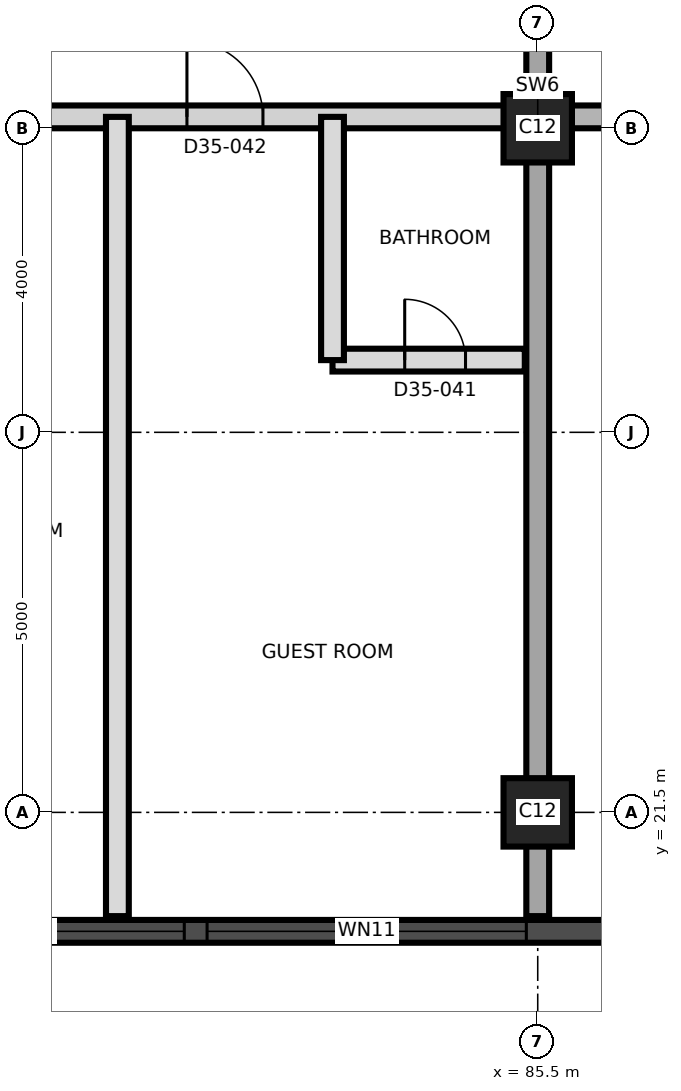
"""IFC4 building model, lengths in metres.
Left out: names, types, materials, properties, quantities, classifications, styles, units other than length and angle.
Written with IfcOpenShell. Run it as: python <this file> out.ifc"""

import sys

from ifc_helpers import new_model, si_unit, direction, frame, frame_2d, origin, origin_2d, place, context, subcontext, project, spatial, rectangle, extrude, element, fill, save


model = new_model("IFC4")
c1 = context("Model", 3, precision=1e-05, world=origin(), true_north=direction((0.0, 1.0)))
c2 = subcontext(c1, "Body", "Model", "MODEL_VIEW")
j1 = project(units=[si_unit("LENGTHUNIT", "METRE"), si_unit("PLANEANGLEUNIT", "RADIAN")], contexts=[c1])
p1 = place(None, origin())
s1 = spatial("IfcSite", under=j1, at=p1, CompositionType="ELEMENT")
p2 = place(p1, origin())
s2 = spatial("IfcBuilding", under=s1, at=p2, CompositionType="ELEMENT")
p3 = place(p2, frame((0.0, 0.0, 195.8)))
s3 = spatial("IfcBuildingStorey", under=s2, at=p3, CompositionType="ELEMENT", Elevation=195.8)
for number, where, z_axis, x_axis in (
    (1, (85.5, 21.5, 0.0), (0.0, 0.0, 1.0), (1.0, 0.0, 0.0)),
    (2, (85.5, 30.5, 0.0), (0.0, 0.0, 1.0), (1.0, 0.0, 0.0)),
):
    element("IfcColumn", number, at=place(p3, frame(where, z_axis=z_axis, x_axis=x_axis)), inside=s3, PredefinedType="COLUMN", context=c2, shape_type="SweptSolid", body=[
        extrude(rectangle(XDim=0.9, YDim=0.9, at=origin_2d()), origin(), (0.0, 0.0, 1.0), 3.7),
    ])
p4 = place(p3, frame((85.5, 20.135, 0.0), z_axis=(0.0, 0.0, 1.0), x_axis=(0.0, 1.0, 0.0)))
e3 = element("IfcWall", 3, at=p4, inside=s3, PredefinedType="SHEAR", context=c2, shape_type="SweptSolid", body=[
    extrude(rectangle(XDim=20.73, YDim=0.3, at=frame_2d((10.365, 0.0))), origin(), (0.0, 0.0, 1.0), 3.7),
])
p5 = place(p4, frame((11.565, 0.0, 0.0)))
e4 = element("IfcOpeningElement", 4, at=p5, cuts=e3, PredefinedType="OPENING", context=c2, shape_type="SweptSolid", body=[
    extrude(rectangle(XDim=1.4, YDim=2.1, at=frame_2d((0.7, 1.05))), frame((0.0, 0.16, 0.0), z_axis=(0.0, -1.0, 0.0), x_axis=(1.0, 0.0, 0.0)), (0.0, 0.0, 1.0), 0.32),
])
p6 = place(p3, frame((44.01, 19.935, 0.0), z_axis=(0.0, 0.0, 1.0), x_axis=(1.0, 0.0, 0.0)))
e5 = element("IfcWall", 5, at=p6, inside=s3, PredefinedType="SOLIDWALL", context=c2, shape_type="SweptSolid", body=[
    extrude(rectangle(XDim=43.477, YDim=0.3, at=frame_2d((21.738, 0.0))), origin(), (0.0, 0.0, 1.0), 3.4),
])
p7 = place(p6, frame((1.845, 0.0, 0.3)))
e6 = element("IfcOpeningElement", 6, at=p7, cuts=e5, PredefinedType="OPENING", context=c2, shape_type="SweptSolid", body=[
    extrude(rectangle(XDim=1.8, YDim=2.4, at=frame_2d((0.9, 1.2))), frame((0.0, 0.16, 0.0), z_axis=(0.0, -1.0, 0.0), x_axis=(1.0, 0.0, 0.0)), (0.0, 0.0, 1.0), 0.32),
])
p8 = place(p6, frame((5.64, 0.0, 0.9)))
e7 = element("IfcOpeningElement", 7, at=p8, cuts=e5, PredefinedType="OPENING", context=c2, shape_type="SweptSolid", body=[
    extrude(rectangle(XDim=4.2, YDim=1.5, at=frame_2d((2.1, 0.75))), frame((0.0, 0.16, 0.0), z_axis=(0.0, -1.0, 0.0), x_axis=(1.0, 0.0, 0.0)), (0.0, 0.0, 1.0), 0.32),
])
p9 = place(p6, frame((10.14, 0.0, 0.9)))
e8 = element("IfcOpeningElement", 8, at=p9, cuts=e5, PredefinedType="OPENING", context=c2, shape_type="SweptSolid", body=[
    extrude(rectangle(XDim=4.2, YDim=1.5, at=frame_2d((2.1, 0.75))), frame((0.0, 0.16, 0.0), z_axis=(0.0, -1.0, 0.0), x_axis=(1.0, 0.0, 0.0)), (0.0, 0.0, 1.0), 0.32),
])
p10 = place(p6, frame((14.64, 0.0, 0.9)))
e9 = element("IfcOpeningElement", 9, at=p10, cuts=e5, PredefinedType="OPENING", context=c2, shape_type="SweptSolid", body=[
    extrude(rectangle(XDim=4.2, YDim=1.5, at=frame_2d((2.1, 0.75))), frame((0.0, 0.16, 0.0), z_axis=(0.0, -1.0, 0.0), x_axis=(1.0, 0.0, 0.0)), (0.0, 0.0, 1.0), 0.32),
])
p11 = place(p6, frame((19.14, 0.0, 0.9)))
e10 = element("IfcOpeningElement", 10, at=p11, cuts=e5, PredefinedType="OPENING", context=c2, shape_type="SweptSolid", body=[
    extrude(rectangle(XDim=4.2, YDim=1.5, at=frame_2d((2.1, 0.75))), frame((0.0, 0.16, 0.0), z_axis=(0.0, -1.0, 0.0), x_axis=(1.0, 0.0, 0.0)), (0.0, 0.0, 1.0), 0.32),
])
p12 = place(p6, frame((23.64, 0.0, 0.9)))
e11 = element("IfcOpeningElement", 11, at=p12, cuts=e5, PredefinedType="OPENING", context=c2, shape_type="SweptSolid", body=[
    extrude(rectangle(XDim=4.2, YDim=1.5, at=frame_2d((2.1, 0.75))), frame((0.0, 0.16, 0.0), z_axis=(0.0, -1.0, 0.0), x_axis=(1.0, 0.0, 0.0)), (0.0, 0.0, 1.0), 0.32),
])
p13 = place(p6, frame((28.14, 0.0, 0.9)))
e12 = element("IfcOpeningElement", 12, at=p13, cuts=e5, PredefinedType="OPENING", context=c2, shape_type="SweptSolid", body=[
    extrude(rectangle(XDim=4.2, YDim=1.5, at=frame_2d((2.1, 0.75))), frame((0.0, 0.16, 0.0), z_axis=(0.0, -1.0, 0.0), x_axis=(1.0, 0.0, 0.0)), (0.0, 0.0, 1.0), 0.32),
])
p14 = place(p6, frame((32.64, 0.0, 0.9)))
e13 = element("IfcOpeningElement", 13, at=p14, cuts=e5, PredefinedType="OPENING", context=c2, shape_type="SweptSolid", body=[
    extrude(rectangle(XDim=4.2, YDim=1.5, at=frame_2d((2.1, 0.75))), frame((0.0, 0.16, 0.0), z_axis=(0.0, -1.0, 0.0), x_axis=(1.0, 0.0, 0.0)), (0.0, 0.0, 1.0), 0.32),
])
p15 = place(p6, frame((37.14, 0.0, 0.9)))
e14 = element("IfcOpeningElement", 14, at=p15, cuts=e5, PredefinedType="OPENING", context=c2, shape_type="SweptSolid", body=[
    extrude(rectangle(XDim=4.2, YDim=1.5, at=frame_2d((2.1, 0.75))), frame((0.0, 0.16, 0.0), z_axis=(0.0, -1.0, 0.0), x_axis=(1.0, 0.0, 0.0)), (0.0, 0.0, 1.0), 0.32),
])
p16 = place(p3, frame((82.8, 27.45, 0.0), z_axis=(0.0, 0.0, 1.0), x_axis=(1.0, 0.0, 0.0)))
e15 = element("IfcWall", 15, at=p16, inside=s3, PredefinedType="PARTITIONING", context=c2, shape_type="SweptSolid", body=[
    extrude(rectangle(XDim=2.53, YDim=0.3, at=frame_2d((1.265, 0.0))), origin(), (0.0, 0.0, 1.0), 3.4),
])
p17 = place(p16, frame((0.95, 0.0, 0.0)))
e16 = element("IfcOpeningElement", 16, at=p17, cuts=e15, PredefinedType="OPENING", context=c2, shape_type="SweptSolid", body=[
    extrude(rectangle(XDim=0.8, YDim=2.1, at=frame_2d((0.4, 1.05))), frame((0.0, 0.16, 0.0), z_axis=(0.0, -1.0, 0.0), x_axis=(1.0, 0.0, 0.0)), (0.0, 0.0, 1.0), 0.32),
])
p18 = place(p3, frame((58.55, 30.65, 0.0), z_axis=(0.0, 0.0, 1.0), x_axis=(1.0, 0.0, 0.0)))
e17 = element("IfcWall", 17, at=p18, inside=s3, PredefinedType="PARTITIONING", context=c2, shape_type="SweptSolid", body=[
    extrude(rectangle(XDim=26.78, YDim=0.3, at=frame_2d((13.39, 0.0))), origin(), (0.0, 0.0, 1.0), 3.4),
])
p19 = place(p18, frame((1.65, 0.0, 0.0)))
e18 = element("IfcOpeningElement", 18, at=p19, cuts=e17, PredefinedType="OPENING", context=c2, shape_type="SweptSolid", body=[
    extrude(rectangle(XDim=1.2, YDim=2.1, at=frame_2d((0.6, 1.05))), frame((0.0, 0.16, 0.0), z_axis=(0.0, -1.0, 0.0), x_axis=(1.0, 0.0, 0.0)), (0.0, 0.0, 1.0), 0.32),
])
p20 = place(p18, frame((4.9, 0.0, 0.0)))
e19 = element("IfcOpeningElement", 19, at=p20, cuts=e17, PredefinedType="OPENING", context=c2, shape_type="SweptSolid", body=[
    extrude(rectangle(XDim=1.0, YDim=2.1, at=frame_2d((0.5, 1.05))), frame((0.0, 0.16, 0.0), z_axis=(0.0, -1.0, 0.0), x_axis=(1.0, 0.0, 0.0)), (0.0, 0.0, 1.0), 0.32),
])
p21 = place(p18, frame((10.085, 0.0, 0.0)))
e20 = element("IfcOpeningElement", 20, at=p21, cuts=e17, PredefinedType="OPENING", context=c2, shape_type="SweptSolid", body=[
    extrude(rectangle(XDim=1.2, YDim=2.1, at=frame_2d((0.6, 1.05))), frame((0.0, 0.16, 0.0), z_axis=(0.0, -1.0, 0.0), x_axis=(1.0, 0.0, 0.0)), (0.0, 0.0, 1.0), 0.32),
])
p22 = place(p18, frame((13.335, 0.0, 0.0)))
e21 = element("IfcOpeningElement", 21, at=p22, cuts=e17, PredefinedType="OPENING", context=c2, shape_type="SweptSolid", body=[
    extrude(rectangle(XDim=1.0, YDim=2.1, at=frame_2d((0.5, 1.05))), frame((0.0, 0.16, 0.0), z_axis=(0.0, -1.0, 0.0), x_axis=(1.0, 0.0, 0.0)), (0.0, 0.0, 1.0), 0.32),
])
p23 = place(p18, frame((19.085, 0.0, 0.0)))
e22 = element("IfcOpeningElement", 22, at=p23, cuts=e17, PredefinedType="OPENING", context=c2, shape_type="SweptSolid", body=[
    extrude(rectangle(XDim=1.2, YDim=2.1, at=frame_2d((0.6, 1.05))), frame((0.0, 0.16, 0.0), z_axis=(0.0, -1.0, 0.0), x_axis=(1.0, 0.0, 0.0)), (0.0, 0.0, 1.0), 0.32),
])
p24 = place(p18, frame((22.335, 0.0, 0.0)))
e23 = element("IfcOpeningElement", 23, at=p24, cuts=e17, PredefinedType="OPENING", context=c2, shape_type="SweptSolid", body=[
    extrude(rectangle(XDim=1.0, YDim=2.1, at=frame_2d((0.5, 1.05))), frame((0.0, 0.16, 0.0), z_axis=(0.0, -1.0, 0.0), x_axis=(1.0, 0.0, 0.0)), (0.0, 0.0, 1.0), 0.32),
])
p25 = place(p3, frame((85.67, 30.65, 0.0), z_axis=(0.0, 0.0, 1.0), x_axis=(1.0, 0.0, 0.0)))
e24 = element("IfcWall", 24, at=p25, inside=s3, PredefinedType="SHEAR", context=c2, shape_type="SweptSolid", body=[
    extrude(rectangle(XDim=9.58, YDim=0.3, at=frame_2d((4.79, 0.0))), origin(), (0.0, 0.0, 1.0), 3.4),
])
p26 = place(p25, frame((2.08, 0.0, 0.0)))
e25 = element("IfcOpeningElement", 25, at=p26, cuts=e24, PredefinedType="OPENING", context=c2, shape_type="SweptSolid", body=[
    extrude(rectangle(XDim=1.2, YDim=2.1, at=frame_2d((0.6, 1.05))), frame((0.0, 0.16, 0.0), z_axis=(0.0, -1.0, 0.0), x_axis=(1.0, 0.0, 0.0)), (0.0, 0.0, 1.0), 0.32),
])
p27 = place(p25, frame((5.63, 0.0, 0.0)))
e26 = element("IfcOpeningElement", 26, at=p27, cuts=e24, PredefinedType="OPENING", context=c2, shape_type="SweptSolid", body=[
    extrude(rectangle(XDim=1.0, YDim=2.1, at=frame_2d((0.5, 1.05))), frame((0.0, 0.16, 0.0), z_axis=(0.0, -1.0, 0.0), x_axis=(1.0, 0.0, 0.0)), (0.0, 0.0, 1.0), 0.32),
])
p28 = place(p3, frame((79.97, 20.135, 0.0), z_axis=(0.0, 0.0, 1.0), x_axis=(0.0, 1.0, 0.0)))
e27 = element("IfcWall", 27, at=p28, inside=s3, PredefinedType="PARTITIONING", context=c2, shape_type="SweptSolid", body=[
    extrude(rectangle(XDim=10.515, YDim=0.3, at=frame_2d((5.257, 0.0))), origin(), (0.0, 0.0, 1.0), 3.4),
])
p29 = place(p3, frame((82.8, 27.45, 0.0), z_axis=(0.0, 0.0, 1.0), x_axis=(0.0, 1.0, 0.0)))
e28 = element("IfcWall", 28, at=p29, inside=s3, PredefinedType="PARTITIONING", context=c2, shape_type="SweptSolid", body=[
    extrude(rectangle(XDim=3.2, YDim=0.3, at=frame_2d((1.6, 0.0))), origin(), (0.0, 0.0, 1.0), 3.4),
])
p30 = place(p14, origin())
e29 = element("IfcWindow", 29, at=p30, inside=s3, PartitioningType="SINGLE_PANEL", PredefinedType="WINDOW", context=c2, shape_type="SweptSolid", body=[
    extrude(rectangle(XDim=4.2, YDim=1.5, at=frame_2d((2.1, 0.75))), frame((0.0, 0.03, 0.0), z_axis=(0.0, -1.0, 0.0), x_axis=(1.0, 0.0, 0.0)), (0.0, 0.0, 1.0), 0.06),
])
fill(e13, e29)
p31 = place(p15, origin())
e30 = element("IfcWindow", 30, at=p31, inside=s3, PartitioningType="SINGLE_PANEL", PredefinedType="WINDOW", context=c2, shape_type="SweptSolid", body=[
    extrude(rectangle(XDim=4.2, YDim=1.5, at=frame_2d((2.1, 0.75))), frame((0.0, 0.03, 0.0), z_axis=(0.0, -1.0, 0.0), x_axis=(1.0, 0.0, 0.0)), (0.0, 0.0, 1.0), 0.06),
])
fill(e14, e30)
p32 = place(p17, origin())
e31 = element("IfcDoor", 31, at=p32, inside=s3, OperationType="SINGLE_SWING_LEFT", PredefinedType="DOOR", context=c2, shape_type="SweptSolid", body=[
    extrude(rectangle(XDim=0.8, YDim=2.1, at=frame_2d((0.4, 1.05))), frame((0.0, 0.025, 0.0), z_axis=(0.0, -1.0, 0.0), x_axis=(1.0, 0.0, 0.0)), (0.0, 0.0, 1.0), 0.05),
])
fill(e16, e31)
p33 = place(p24, origin())
e32 = element("IfcDoor", 32, at=p33, inside=s3, OperationType="SINGLE_SWING_RIGHT", PredefinedType="DOOR", context=c2, shape_type="SweptSolid", body=[
    extrude(rectangle(XDim=1.0, YDim=2.1, at=frame_2d((0.5, 1.05))), frame((0.0, 0.025, 0.0), z_axis=(0.0, -1.0, 0.0), x_axis=(1.0, 0.0, 0.0)), (0.0, 0.0, 1.0), 0.05),
])
fill(e23, e32)
save(model, sys.argv[1])
